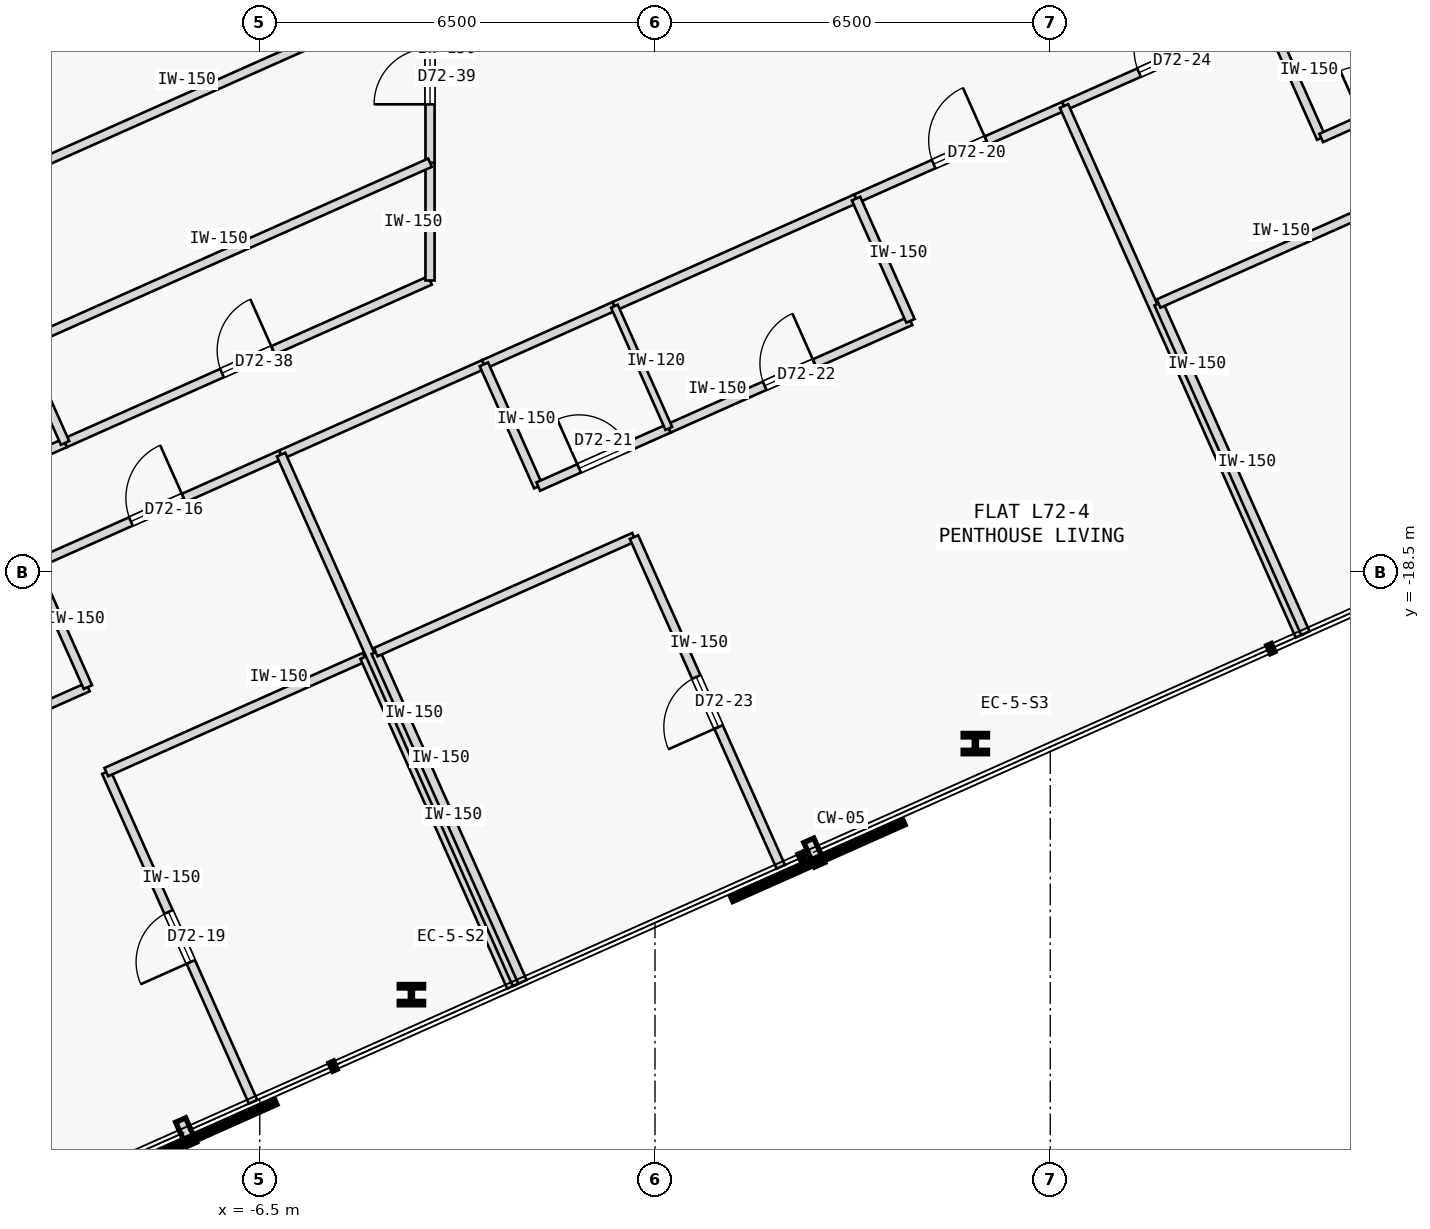
"""IFC4 building model, lengths in metres.
Left out: names, types, materials, properties, quantities, classifications, styles, units other than length and angle.
Written with IfcOpenShell. Run it as: python <this file> out.ifc"""

import sys

from ifc_helpers import new_model, si_unit, direction, frame, frame_2d, origin, origin_2d, place, context, subcontext, project, spatial, rectangle, i_section, extrude, element, fill, save


model = new_model("IFC4")
c1 = context("Model", 3, precision=1e-05, world=origin(), true_north=direction((0.0, 1.0)))
c2 = subcontext(c1, "Body", "Model", "MODEL_VIEW")
j1 = project(units=[si_unit("LENGTHUNIT", "METRE"), si_unit("PLANEANGLEUNIT", "RADIAN")], contexts=[c1])
p1 = place(None, origin())
s1 = spatial("IfcSite", under=j1, at=p1, CompositionType="ELEMENT")
p2 = place(p1, origin())
s2 = spatial("IfcBuilding", under=s1, at=p2, CompositionType="ELEMENT")
p3 = place(p2, frame((0.0, 0.0, 268.9)))
s3 = spatial("IfcBuildingStorey", under=s2, at=p3, CompositionType="ELEMENT", Elevation=268.9)
for number, where, z_axis, x_axis in (
    (1, (-4.006, -25.448, 0.0), (0.0, 0.0, 1.0), (1.0, 0.0, 0.0)),
    (2, (5.268, -21.319, 0.0), (0.0, 0.0, 1.0), (1.0, 0.0, 0.0)),
):
    element("IfcColumn", number, at=place(p3, frame(where, z_axis=z_axis, x_axis=x_axis)), inside=s3, PredefinedType="COLUMN", context=c2, shape_type="SweptSolid", body=[
        extrude(i_section(OverallWidth=0.401, OverallDepth=0.335, WebThickness=0.036, FlangeThickness=0.058, FilletRadius=0.015, at=origin_2d()), origin(), (0.0, 0.0, 1.0), 3.35),
    ])
p4 = place(p3, frame((-10.221, -18.38, 0.0), z_axis=(0.0, 0.0, 1.0), x_axis=(0.913542602601, 0.406743055543, 0.0)))
e3 = element("IfcWall", 3, at=p4, inside=s3, PredefinedType="PARTITIONING", context=c2, shape_type="SweptSolid", body=[
    extrude(rectangle(XDim=4.458, YDim=0.15, at=frame_2d((2.229, 0.0))), origin(), (0.0, 0.0, 1.0), 3.125),
])
p5 = place(p4, frame((1.754, 0.0, 0.0)))
e4 = element("IfcOpeningElement", 4, at=p5, cuts=e3, PredefinedType="OPENING", context=c2, shape_type="SweptSolid", body=[
    extrude(rectangle(XDim=0.95, YDim=2.15, at=frame_2d((0.475, 1.075))), frame((0.0, 0.085, 0.0), z_axis=(0.0, -1.0, 0.0), x_axis=(1.0, 0.0, 0.0)), (0.0, 0.0, 1.0), 0.17),
])
p6 = place(p3, frame((-6.149, -16.567, 0.0), z_axis=(0.0, 0.0, 1.0), x_axis=(0.913543802, 0.40674036169, 0.0)))
e5 = element("IfcWall", 5, at=p6, inside=s3, PredefinedType="PARTITIONING", context=c2, shape_type="SweptSolid", body=[
    extrude(rectangle(XDim=3.65, YDim=0.15, at=frame_2d((1.825, 0.0))), origin(), (0.0, 0.0, 1.0), 3.125),
])
p7 = place(p3, frame((3.306, -12.357, 0.0), z_axis=(0.0, 0.0, 1.0), x_axis=(0.913550513402, 0.406725287464, 0.0)))
e6 = element("IfcWall", 6, at=p7, inside=s3, PredefinedType="PARTITIONING", context=c2, shape_type="SweptSolid", body=[
    extrude(rectangle(XDim=3.744, YDim=0.15, at=frame_2d((1.872, 0.0))), origin(), (0.0, 0.0, 1.0), 3.125),
])
p8 = place(p7, frame((1.397, 0.0, 0.0)))
e7 = element("IfcOpeningElement", 7, at=p8, cuts=e6, PredefinedType="OPENING", context=c2, shape_type="SweptSolid", body=[
    extrude(rectangle(XDim=0.95, YDim=2.15, at=frame_2d((0.475, 1.075))), frame((0.0, 0.085, 0.0), z_axis=(0.0, -1.0, 0.0), x_axis=(1.0, 0.0, 0.0)), (0.0, 0.0, 1.0), 0.17),
])
p9 = place(p3, frame((-2.814, -15.082, 0.0), z_axis=(0.0, 0.0, 1.0), x_axis=(0.913558622212, 0.406707073682, 0.0)))
e8 = element("IfcWall", 8, at=p9, inside=s3, PredefinedType="PARTITIONING", context=c2, shape_type="SweptSolid", body=[
    extrude(rectangle(XDim=2.35, YDim=0.15, at=frame_2d((1.175, 0.0))), origin(), (0.0, 0.0, 1.0), 3.125),
])
p10 = place(p3, frame((-0.667, -14.126, 0.0), z_axis=(0.0, 0.0, 1.0), x_axis=(0.913545193015, 0.406737237438, 0.0)))
e9 = element("IfcWall", 9, at=p10, inside=s3, PredefinedType="PARTITIONING", context=c2, shape_type="SweptSolid", body=[
    extrude(rectangle(XDim=4.35, YDim=0.15, at=frame_2d((2.175, 0.0))), origin(), (0.0, 0.0, 1.0), 3.125),
])
p11 = place(p3, frame((6.727, -10.834, 0.0), z_axis=(0.0, 0.0, 1.0), x_axis=(0.913543802, 0.40674036169, 0.0)))
e10 = element("IfcWall", 10, at=p11, inside=s3, PredefinedType="PARTITIONING", context=c2, shape_type="SweptSolid", body=[
    extrude(rectangle(XDim=3.65, YDim=0.15, at=frame_2d((1.825, 0.0))), origin(), (0.0, 0.0, 1.0), 3.125),
])
p12 = place(p11, frame((1.35, 0.0, 0.0)))
e11 = element("IfcOpeningElement", 11, at=p12, cuts=e10, PredefinedType="OPENING", context=c2, shape_type="SweptSolid", body=[
    extrude(rectangle(XDim=0.95, YDim=2.15, at=frame_2d((0.475, 1.075))), frame((0.0, 0.085, 0.0), z_axis=(0.0, -1.0, 0.0), x_axis=(1.0, 0.0, 0.0)), (0.0, 0.0, 1.0), 0.17),
])
p13 = place(p3, frame((-20.445, -21.159, 0.0), z_axis=(0.0, 0.0, 1.0), x_axis=(0.913547681516, 0.406731648137, 0.0)))
e12 = element("IfcWall", 12, at=p13, inside=s3, PredefinedType="PARTITIONING", context=c2, shape_type="SweptSolid", body=[
    extrude(rectangle(XDim=11.76, YDim=0.15, at=frame_2d((5.88, 0.0))), origin(), (0.0, 0.0, 1.0), 3.125),
])
p14 = place(p13, frame((5.42, 0.0, 0.0)))
e13 = element("IfcOpeningElement", 13, at=p14, cuts=e12, PredefinedType="OPENING", context=c2, shape_type="SweptSolid", body=[
    extrude(rectangle(XDim=0.92, YDim=2.15, at=frame_2d((0.46, 1.075))), frame((0.0, 0.085, 0.0), z_axis=(0.0, -1.0, 0.0), x_axis=(1.0, 0.0, 0.0)), (0.0, 0.0, 1.0), 0.17),
])
p15 = place(p3, frame((-9.702, -16.375, 0.0), z_axis=(0.0, 0.0, 1.0), x_axis=(0.913552389019, 0.406721074594, 0.0)))
e14 = element("IfcWall", 14, at=p15, inside=s3, PredefinedType="PARTITIONING", context=c2, shape_type="SweptSolid", body=[
    extrude(rectangle(XDim=6.57, YDim=0.15, at=frame_2d((3.285, 0.0))), origin(), (0.0, 0.0, 1.0), 3.125),
])
p16 = place(p15, frame((2.825, 0.0, 0.0)))
e15 = element("IfcOpeningElement", 15, at=p16, cuts=e14, PredefinedType="OPENING", context=c2, shape_type="SweptSolid", body=[
    extrude(rectangle(XDim=0.92, YDim=2.15, at=frame_2d((0.46, 1.075))), frame((0.0, 0.085, 0.0), z_axis=(0.0, -1.0, 0.0), x_axis=(1.0, 0.0, 0.0)), (0.0, 0.0, 1.0), 0.17),
])
p17 = place(p3, frame((-3.7, -13.703, 0.0), z_axis=(0.0, 0.0, 1.0), x_axis=(0.000126055716, 0.999999992055, 0.0)))
e16 = element("IfcWall", 16, at=p17, inside=s3, PredefinedType="PARTITIONING", context=c2, shape_type="SweptSolid", body=[
    extrude(rectangle(XDim=1.937, YDim=0.15, at=frame_2d((0.968, 0.0))), origin(), (0.0, 0.0, 1.0), 3.125),
])
p18 = place(p3, frame((-3.7, -11.767, 0.0), z_axis=(0.0, 0.0, 1.0), x_axis=(-0.000171850831, 0.999999985234, 0.0)))
e17 = element("IfcWall", 17, at=p18, inside=s3, PredefinedType="PARTITIONING", context=c2, shape_type="SweptSolid", body=[
    extrude(rectangle(XDim=2.841, YDim=0.15, at=frame_2d((1.421, 0.0))), origin(), (0.0, 0.0, 1.0), 3.125),
])
p19 = place(p18, frame((0.961, 0.0, 0.0)))
e18 = element("IfcOpeningElement", 18, at=p19, cuts=e17, PredefinedType="OPENING", context=c2, shape_type="SweptSolid", body=[
    extrude(rectangle(XDim=0.92, YDim=2.15, at=frame_2d((0.46, 1.075))), frame((0.0, 0.085, 0.0), z_axis=(0.0, -1.0, 0.0), x_axis=(1.0, 0.0, 0.0)), (0.0, 0.0, 1.0), 0.17),
])
p20 = place(p3, frame((-13.301, -22.159, 0.0), z_axis=(0.0, 0.0, 1.0), x_axis=(0.913545193015, 0.406737237438, 0.0)))
e19 = element("IfcWall", 19, at=p20, inside=s3, PredefinedType="PARTITIONING", context=c2, shape_type="SweptSolid", body=[
    extrude(rectangle(XDim=4.35, YDim=0.15, at=frame_2d((2.175, 0.0))), origin(), (0.0, 0.0, 1.0), 3.125),
])
p21 = place(p20, frame((1.725, 0.0, 0.0)))
e20 = element("IfcOpeningElement", 20, at=p21, cuts=e19, PredefinedType="OPENING", context=c2, shape_type="SweptSolid", body=[
    extrude(rectangle(XDim=0.9, YDim=2.15, at=frame_2d((0.45, 1.075))), frame((0.0, 0.085, 0.0), z_axis=(0.0, -1.0, 0.0), x_axis=(1.0, 0.0, 0.0)), (0.0, 0.0, 1.0), 0.17),
])
p22 = place(p3, frame((-9.327, -20.39, 0.0), z_axis=(0.0, 0.0, 1.0), x_axis=(-0.406725294076, 0.913550510459, 0.0)))
e21 = element("IfcWall", 21, at=p22, inside=s3, PredefinedType="PARTITIONING", context=c2, shape_type="SweptSolid", body=[
    extrude(rectangle(XDim=2.2, YDim=0.15, at=frame_2d((1.1, 0.0))), origin(), (0.0, 0.0, 1.0), 3.125),
])
p23 = place(p3, frame((-6.61, -27.21, 0.0), z_axis=(0.0, 0.0, 1.0), x_axis=(-0.406699433793, 0.913562023375, 0.0)))
e22 = element("IfcWall", 22, at=p23, inside=s3, PredefinedType="PARTITIONING", context=c2, shape_type="SweptSolid", body=[
    extrude(rectangle(XDim=5.935, YDim=0.15, at=frame_2d((2.968, 0.0))), origin(), (0.0, 0.0, 1.0), 3.125),
])
p24 = place(p23, frame((2.518, 0.0, 0.0)))
e23 = element("IfcOpeningElement", 23, at=p24, cuts=e22, PredefinedType="OPENING", context=c2, shape_type="SweptSolid", body=[
    extrude(rectangle(XDim=0.9, YDim=2.15, at=frame_2d((0.45, 1.075))), frame((0.0, 0.085, 0.0), z_axis=(0.0, -1.0, 0.0), x_axis=(1.0, 0.0, 0.0)), (0.0, 0.0, 1.0), 0.17),
])
p25 = place(p3, frame((-9.024, -21.788, 0.0), z_axis=(0.0, 0.0, 1.0), x_axis=(0.913564558304, 0.406693739576, 0.0)))
e24 = element("IfcWall", 24, at=p25, inside=s3, PredefinedType="PARTITIONING", context=c2, shape_type="SweptSolid", body=[
    extrude(rectangle(XDim=4.65, YDim=0.15, at=frame_2d((2.325, 0.0))), origin(), (0.0, 0.0, 1.0), 3.125),
])
p26 = place(p3, frame((-2.362, -25.318, 0.0), z_axis=(0.0, 0.0, 1.0), x_axis=(-0.406714717734, 0.913555219119, 0.0)))
e25 = element("IfcWall", 25, at=p26, inside=s3, PredefinedType="PARTITIONING", context=c2, shape_type="SweptSolid", body=[
    extrude(rectangle(XDim=5.935, YDim=0.15, at=frame_2d((2.967, 0.0))), origin(), (0.0, 0.0, 1.0), 3.125),
])
p27 = place(p3, frame((-2.271, -25.278, 0.0), z_axis=(0.0, 0.0, 1.0), x_axis=(-0.406751296215, 0.913538933504, 0.0)))
e26 = element("IfcWall", 26, at=p27, inside=s3, PredefinedType="PARTITIONING", context=c2, shape_type="SweptSolid", body=[
    extrude(rectangle(XDim=9.535, YDim=0.15, at=frame_2d((4.768, 0.0))), origin(), (0.0, 0.0, 1.0), 3.125),
])
p28 = place(p3, frame((-1.92, -17.092, 0.0), z_axis=(0.0, 0.0, 1.0), x_axis=(-0.406725294076, 0.913550510459, 0.0)))
e27 = element("IfcWall", 27, at=p28, inside=s3, PredefinedType="PARTITIONING", context=c2, shape_type="SweptSolid", body=[
    extrude(rectangle(XDim=2.2, YDim=0.15, at=frame_2d((1.1, 0.0))), origin(), (0.0, 0.0, 1.0), 3.125),
])
p29 = place(p3, frame((-1.92, -17.092, 0.0), z_axis=(0.0, 0.0, 1.0), x_axis=(0.913558622212, 0.406707073682, 0.0)))
e28 = element("IfcWall", 28, at=p29, inside=s3, PredefinedType="PARTITIONING", context=c2, shape_type="SweptSolid", body=[
    extrude(rectangle(XDim=2.35, YDim=0.15, at=frame_2d((1.175, 0.0))), origin(), (0.0, 0.0, 1.0), 3.125),
])
p30 = place(p29, frame((0.735, 0.0, 0.0)))
e29 = element("IfcOpeningElement", 29, at=p30, cuts=e28, PredefinedType="OPENING", context=c2, shape_type="SweptSolid", body=[
    extrude(rectangle(XDim=0.88, YDim=2.15, at=frame_2d((0.44, 1.075))), frame((0.0, 0.085, 0.0), z_axis=(0.0, -1.0, 0.0), x_axis=(1.0, 0.0, 0.0)), (0.0, 0.0, 1.0), 0.17),
])
p31 = place(p3, frame((0.227, -16.136, 0.0), z_axis=(0.0, 0.0, 1.0), x_axis=(0.913545193015, 0.406737237438, 0.0)))
e30 = element("IfcWall", 30, at=p31, inside=s3, PredefinedType="PARTITIONING", context=c2, shape_type="SweptSolid", body=[
    extrude(rectangle(XDim=4.35, YDim=0.15, at=frame_2d((2.175, 0.0))), origin(), (0.0, 0.0, 1.0), 3.125),
])
p32 = place(p31, frame((1.725, 0.0, 0.0)))
e31 = element("IfcOpeningElement", 31, at=p32, cuts=e30, PredefinedType="OPENING", context=c2, shape_type="SweptSolid", body=[
    extrude(rectangle(XDim=0.9, YDim=2.15, at=frame_2d((0.45, 1.075))), frame((0.0, 0.085, 0.0), z_axis=(0.0, -1.0, 0.0), x_axis=(1.0, 0.0, 0.0)), (0.0, 0.0, 1.0), 0.17),
])
p33 = place(p3, frame((4.201, -14.367, 0.0), z_axis=(0.0, 0.0, 1.0), x_axis=(-0.406725294076, 0.913550510459, 0.0)))
e32 = element("IfcWall", 32, at=p33, inside=s3, PredefinedType="PARTITIONING", context=c2, shape_type="SweptSolid", body=[
    extrude(rectangle(XDim=2.2, YDim=0.15, at=frame_2d((1.1, 0.0))), origin(), (0.0, 0.0, 1.0), 3.125),
])
p34 = place(p3, frame((-2.179, -25.237, 0.0), z_axis=(0.0, 0.0, 1.0), x_axis=(-0.406749048544, 0.913539934271, 0.0)))
e33 = element("IfcWall", 33, at=p34, inside=s3, PredefinedType="PARTITIONING", context=c2, shape_type="SweptSolid", body=[
    extrude(rectangle(XDim=5.935, YDim=0.15, at=frame_2d((2.968, 0.0))), origin(), (0.0, 0.0, 1.0), 3.125),
])
p35 = place(p3, frame((-4.593, -19.815, 0.0), z_axis=(0.0, 0.0, 1.0), x_axis=(0.91354505039, 0.40673755778, 0.0)))
e34 = element("IfcWall", 34, at=p35, inside=s3, PredefinedType="PARTITIONING", context=c2, shape_type="SweptSolid", body=[
    extrude(rectangle(XDim=4.65, YDim=0.15, at=frame_2d((2.325, 0.0))), origin(), (0.0, 0.0, 1.0), 3.125),
])
p36 = place(p3, frame((2.069, -23.346, 0.0), z_axis=(0.0, 0.0, 1.0), x_axis=(-0.406699433793, 0.913562023375, 0.0)))
e35 = element("IfcWall", 35, at=p36, inside=s3, PredefinedType="PARTITIONING", context=c2, shape_type="SweptSolid", body=[
    extrude(rectangle(XDim=5.935, YDim=0.15, at=frame_2d((2.968, 0.0))), origin(), (0.0, 0.0, 1.0), 3.125),
])
p37 = place(p36, frame((2.518, 0.0, 0.0)))
e36 = element("IfcOpeningElement", 36, at=p37, cuts=e35, PredefinedType="OPENING", context=c2, shape_type="SweptSolid", body=[
    extrude(rectangle(XDim=0.9, YDim=2.15, at=frame_2d((0.45, 1.075))), frame((0.0, 0.085, 0.0), z_axis=(0.0, -1.0, 0.0), x_axis=(1.0, 0.0, 0.0)), (0.0, 0.0, 1.0), 0.17),
])
p38 = place(p3, frame((10.605, -19.545, 0.0), z_axis=(0.0, 0.0, 1.0), x_axis=(-0.406760810574, 0.913534697196, 0.0)))
e37 = element("IfcWall", 37, at=p38, inside=s3, PredefinedType="PARTITIONING", context=c2, shape_type="SweptSolid", body=[
    extrude(rectangle(XDim=9.535, YDim=0.15, at=frame_2d((4.768, 0.0))), origin(), (0.0, 0.0, 1.0), 3.125),
])
p39 = place(p3, frame((0.227, -16.136, 0.0), z_axis=(0.0, 0.0, 1.0), x_axis=(-0.406725294076, 0.913550510459, 0.0)))
e38 = element("IfcWall", 38, at=p39, inside=s3, PredefinedType="PARTITIONING", context=c2, shape_type="SweptSolid", body=[
    extrude(rectangle(XDim=2.2, YDim=0.12, at=frame_2d((1.1, 0.0))), origin(), (0.0, 0.0, 1.0), 3.125),
])
p40 = place(p3, frame((10.956, -11.36, 0.0), z_axis=(0.0, 0.0, 1.0), x_axis=(-0.406725294076, 0.913550510459, 0.0)))
e39 = element("IfcWall", 39, at=p40, inside=s3, PredefinedType="PARTITIONING", context=c2, shape_type="SweptSolid", body=[
    extrude(rectangle(XDim=2.2, YDim=0.15, at=frame_2d((1.1, 0.0))), origin(), (0.0, 0.0, 1.0), 3.125),
])
p41 = place(p3, frame((10.956, -11.36, 0.0), z_axis=(0.0, 0.0, 1.0), x_axis=(0.913558622212, 0.406707073682, 0.0)))
e40 = element("IfcWall", 40, at=p41, inside=s3, PredefinedType="PARTITIONING", context=c2, shape_type="SweptSolid", body=[
    extrude(rectangle(XDim=2.35, YDim=0.15, at=frame_2d((1.175, 0.0))), origin(), (0.0, 0.0, 1.0), 3.125),
])
p42 = place(p41, frame((0.735, 0.0, 0.0)))
e41 = element("IfcOpeningElement", 41, at=p42, cuts=e40, PredefinedType="OPENING", context=c2, shape_type="SweptSolid", body=[
    extrude(rectangle(XDim=0.88, YDim=2.15, at=frame_2d((0.44, 1.075))), frame((0.0, 0.085, 0.0), z_axis=(0.0, -1.0, 0.0), x_axis=(1.0, 0.0, 0.0)), (0.0, 0.0, 1.0), 0.17),
])
p43 = place(p3, frame((10.696, -19.504, 0.0), z_axis=(0.0, 0.0, 1.0), x_axis=(-0.406749048544, 0.913539934271, 0.0)))
e42 = element("IfcWall", 42, at=p43, inside=s3, PredefinedType="PARTITIONING", context=c2, shape_type="SweptSolid", body=[
    extrude(rectangle(XDim=5.935, YDim=0.15, at=frame_2d((2.968, 0.0))), origin(), (0.0, 0.0, 1.0), 3.125),
])
p44 = place(p3, frame((8.282, -14.083, 0.0), z_axis=(0.0, 0.0, 1.0), x_axis=(0.91354505039, 0.40673755778, 0.0)))
e43 = element("IfcWall", 43, at=p44, inside=s3, PredefinedType="PARTITIONING", context=c2, shape_type="SweptSolid", body=[
    extrude(rectangle(XDim=4.65, YDim=0.15, at=frame_2d((2.325, 0.0))), origin(), (0.0, 0.0, 1.0), 3.125),
])
p45 = place(p3, frame((-9.702, -16.375, 0.0), z_axis=(0.0, 0.0, 1.0), x_axis=(-0.406740252054, 0.913543850813, 0.0)))
e44 = element("IfcWall", 44, at=p45, inside=s3, PredefinedType="PARTITIONING", context=c2, shape_type="SweptSolid", body=[
    extrude(rectangle(XDim=1.769, YDim=0.15, at=frame_2d((0.884, 0.0))), origin(), (0.0, 0.0, 1.0), 3.125),
])
p46 = place(p3, frame((-10.421, -14.76, 0.0), z_axis=(0.0, 0.0, 1.0), x_axis=(0.913533574053, 0.406763333006, 0.0)))
e45 = element("IfcWall", 45, at=p46, inside=s3, PredefinedType="PARTITIONING", context=c2, shape_type="SweptSolid", body=[
    extrude(rectangle(XDim=7.358, YDim=0.15, at=frame_2d((3.679, 0.0))), origin(), (0.0, 0.0, 1.0), 3.125),
])
p47 = place(p3, frame((-11.477, -12.388, 0.0), z_axis=(0.0, 0.0, 1.0), x_axis=(0.913542897736, 0.406742392673, 0.0)))
e46 = element("IfcWall", 46, at=p47, inside=s3, PredefinedType="PARTITIONING", context=c2, shape_type="SweptSolid", body=[
    extrude(rectangle(XDim=8.513, YDim=0.15, at=frame_2d((4.257, 0.0))), origin(), (0.0, 0.0, 1.0), 3.125),
])
p48 = place(p5, origin())
e47 = element("IfcDoor", 47, at=p48, inside=s3, OperationType="SINGLE_SWING_RIGHT", PredefinedType="DOOR", context=c2, shape_type="SweptSolid", body=[
    extrude(rectangle(XDim=0.95, YDim=2.15, at=frame_2d((0.475, 1.075))), frame((0.0, 0.025, 0.0), z_axis=(0.0, -1.0, 0.0), x_axis=(1.0, 0.0, 0.0)), (0.0, 0.0, 1.0), 0.05),
])
fill(e4, e47)
p49 = place(p24, origin())
e48 = element("IfcDoor", 48, at=p49, inside=s3, OperationType="SINGLE_SWING_LEFT", PredefinedType="DOOR", context=c2, shape_type="SweptSolid", body=[
    extrude(rectangle(XDim=0.9, YDim=2.15, at=frame_2d((0.45, 1.075))), frame((0.0, 0.025, 0.0), z_axis=(0.0, -1.0, 0.0), x_axis=(1.0, 0.0, 0.0)), (0.0, 0.0, 1.0), 0.05),
])
fill(e23, e48)
p50 = place(p8, origin())
e49 = element("IfcDoor", 49, at=p50, inside=s3, OperationType="SINGLE_SWING_RIGHT", PredefinedType="DOOR", context=c2, shape_type="SweptSolid", body=[
    extrude(rectangle(XDim=0.95, YDim=2.15, at=frame_2d((0.475, 1.075))), frame((0.0, 0.025, 0.0), z_axis=(0.0, -1.0, 0.0), x_axis=(1.0, 0.0, 0.0)), (0.0, 0.0, 1.0), 0.05),
])
fill(e7, e49)
p51 = place(p30, origin())
e50 = element("IfcDoor", 50, at=p51, inside=s3, OperationType="SINGLE_SWING_LEFT", PredefinedType="DOOR", context=c2, shape_type="SweptSolid", body=[
    extrude(rectangle(XDim=0.88, YDim=2.15, at=frame_2d((0.44, 1.075))), frame((0.0, 0.025, 0.0), z_axis=(0.0, -1.0, 0.0), x_axis=(1.0, 0.0, 0.0)), (0.0, 0.0, 1.0), 0.05),
])
fill(e29, e50)
p52 = place(p32, origin())
e51 = element("IfcDoor", 51, at=p52, inside=s3, OperationType="SINGLE_SWING_RIGHT", PredefinedType="DOOR", context=c2, shape_type="SweptSolid", body=[
    extrude(rectangle(XDim=0.9, YDim=2.15, at=frame_2d((0.45, 1.075))), frame((0.0, 0.025, 0.0), z_axis=(0.0, -1.0, 0.0), x_axis=(1.0, 0.0, 0.0)), (0.0, 0.0, 1.0), 0.05),
])
fill(e31, e51)
p53 = place(p37, origin())
e52 = element("IfcDoor", 52, at=p53, inside=s3, OperationType="SINGLE_SWING_LEFT", PredefinedType="DOOR", context=c2, shape_type="SweptSolid", body=[
    extrude(rectangle(XDim=0.9, YDim=2.15, at=frame_2d((0.45, 1.075))), frame((0.0, 0.025, 0.0), z_axis=(0.0, -1.0, 0.0), x_axis=(1.0, 0.0, 0.0)), (0.0, 0.0, 1.0), 0.05),
])
fill(e36, e52)
p54 = place(p12, origin())
e53 = element("IfcDoor", 53, at=p54, inside=s3, OperationType="SINGLE_SWING_RIGHT", PredefinedType="DOOR", context=c2, shape_type="SweptSolid", body=[
    extrude(rectangle(XDim=0.95, YDim=2.15, at=frame_2d((0.475, 1.075))), frame((0.0, 0.025, 0.0), z_axis=(0.0, -1.0, 0.0), x_axis=(1.0, 0.0, 0.0)), (0.0, 0.0, 1.0), 0.05),
])
fill(e11, e53)
p55 = place(p16, origin())
e54 = element("IfcDoor", 54, at=p55, inside=s3, OperationType="SINGLE_SWING_RIGHT", PredefinedType="DOOR", context=c2, shape_type="SweptSolid", body=[
    extrude(rectangle(XDim=0.92, YDim=2.15, at=frame_2d((0.46, 1.075))), frame((0.0, 0.025, 0.0), z_axis=(0.0, -1.0, 0.0), x_axis=(1.0, 0.0, 0.0)), (0.0, 0.0, 1.0), 0.05),
])
fill(e15, e54)
p56 = place(p19, origin())
e55 = element("IfcDoor", 55, at=p56, inside=s3, OperationType="SINGLE_SWING_LEFT", PredefinedType="DOOR", context=c2, shape_type="SweptSolid", body=[
    extrude(rectangle(XDim=0.92, YDim=2.15, at=frame_2d((0.46, 1.075))), frame((0.0, 0.025, 0.0), z_axis=(0.0, -1.0, 0.0), x_axis=(1.0, 0.0, 0.0)), (0.0, 0.0, 1.0), 0.05),
])
fill(e18, e55)
save(model, sys.argv[1])
